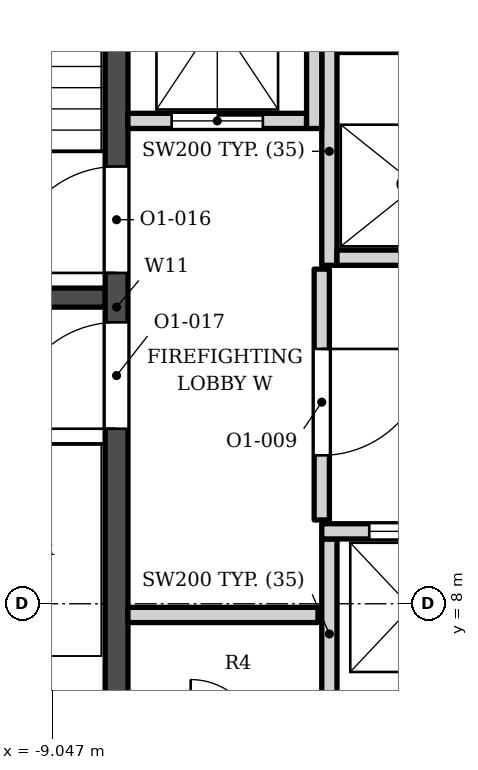
"""IFC4 building model, lengths in metres.
Left out: names, types, materials, properties, quantities, classifications, styles, units other than length and angle.
Written with IfcOpenShell. Run it as: python <this file> out.ifc"""

import sys

from ifc_helpers import new_model, si_unit, direction, frame, frame_2d, origin, place, context, subcontext, project, spatial, rectangle, extrude, element, fill, save


model = new_model("IFC4")
c1 = context("Model", 3, precision=1e-05, world=origin(), true_north=direction((0.0, 1.0)))
c2 = subcontext(c1, "Body", "Model", "MODEL_VIEW")
j1 = project(units=[si_unit("LENGTHUNIT", "METRE"), si_unit("PLANEANGLEUNIT", "RADIAN")], contexts=[c1])
p1 = place(None, origin())
s1 = spatial("IfcSite", under=j1, at=p1, CompositionType="ELEMENT")
p2 = place(p1, origin())
s2 = spatial("IfcBuilding", under=s1, at=p2, CompositionType="ELEMENT")
p3 = place(p2, frame((0.0, 0.0, 144.6)))
s3 = spatial("IfcBuildingStorey", under=s2, at=p3, CompositionType="ELEMENT", Elevation=144.6)
p4 = place(p3, frame((-8.2, 5.253, 0.0), z_axis=(0.0, 0.0, 1.0), x_axis=(0.0, 1.0, 0.0)))
e1 = element("IfcWall", 1, at=p4, inside=s3, PredefinedType="SHEAR", context=c2, shape_type="SweptSolid", body=[
    extrude(rectangle(XDim=13.3, YDim=0.3, at=frame_2d((6.65, 0.0))), origin(), (0.0, 0.0, 1.0), 3.9),
])
p5 = place(p4, frame((7.1, 0.0, 0.0)))
e2 = element("IfcOpeningElement", 2, at=p5, cuts=e1, PredefinedType="OPENING", context=c2, shape_type="SweptSolid", body=[
    extrude(rectangle(XDim=1.4, YDim=2.1, at=frame_2d((0.7, 1.05))), frame((0.0, 0.16, 0.0), z_axis=(0.0, -1.0, 0.0), x_axis=(1.0, 0.0, 0.0)), (0.0, 0.0, 1.0), 0.32),
])
p6 = place(p4, frame((5.05, 0.0, 0.0)))
e3 = element("IfcOpeningElement", 3, at=p6, cuts=e1, PredefinedType="OPENING", context=c2, shape_type="SweptSolid", body=[
    extrude(rectangle(XDim=1.4, YDim=2.1, at=frame_2d((0.7, 1.05))), frame((0.0, 0.16, 0.0), z_axis=(0.0, -1.0, 0.0), x_axis=(1.0, 0.0, 0.0)), (0.0, 0.0, 1.0), 0.32),
])
p7 = place(p3, frame((-12.1, 12.028, 0.0), z_axis=(0.0, 0.0, 1.0), x_axis=(1.0, 0.0, 0.0)))
e4 = element("IfcWall", 4, at=p7, inside=s3, PredefinedType="SHEAR", context=c2, shape_type="SweptSolid", body=[
    extrude(rectangle(XDim=3.75, YDim=0.25, at=frame_2d((1.875, 0.0))), origin(), (0.0, 0.0, 1.0), 3.9),
])
for number, where, z_axis, x_axis in (
    (5, (-5.4, 6.353, 0.0), (0.0, 0.0, 1.0), (0.0, 1.0, 0.0)),
    (6, (-8.05, 7.853, 0.0), (0.0, 0.0, 1.0), (1.0, 0.0, 0.0)),
):
    element("IfcWall", number, at=place(p3, frame(where, z_axis=z_axis, x_axis=x_axis)), inside=s3, PredefinedType="SOLIDWALL", context=c2, shape_type="SweptSolid", body=[
        extrude(rectangle(XDim=2.5, YDim=0.2, at=frame_2d((1.25, 0.0))), origin(), (0.0, 0.0, 1.0), 3.73),
    ])
p8 = place(p3, frame((-5.5, 8.953, 0.0), z_axis=(0.0, 0.0, 1.0), x_axis=(1.0, 0.0, 0.0)))
e7 = element("IfcWall", 7, at=p8, inside=s3, PredefinedType="SOLIDWALL", context=c2, shape_type="SweptSolid", body=[
    extrude(rectangle(XDim=4.5, YDim=0.2, at=frame_2d((2.25, 0.0))), origin(), (0.0, 0.0, 1.0), 3.73),
])
p9 = place(p8, frame((0.625, 0.0, 0.0)))
e8 = element("IfcOpeningElement", 8, at=p9, cuts=e7, PredefinedType="OPENING", context=c2, shape_type="SweptSolid", body=[
    extrude(rectangle(XDim=1.1, YDim=2.1, at=frame_2d((0.55, 1.05))), frame((0.0, 0.11, 0.0), z_axis=(0.0, -1.0, 0.0), x_axis=(1.0, 0.0, 0.0)), (0.0, 0.0, 1.0), 0.22),
])
p10 = place(p8, frame((2.775, 0.0, 0.0)))
e9 = element("IfcOpeningElement", 9, at=p10, cuts=e7, PredefinedType="OPENING", context=c2, shape_type="SweptSolid", body=[
    extrude(rectangle(XDim=1.1, YDim=2.1, at=frame_2d((0.55, 1.05))), frame((0.0, 0.11, 0.0), z_axis=(0.0, -1.0, 0.0), x_axis=(1.0, 0.0, 0.0)), (0.0, 0.0, 1.0), 0.22),
])
p11 = place(p3, frame((-5.5, 9.103, 0.0), z_axis=(0.0, 0.0, 1.0), x_axis=(0.0, 1.0, 0.0)))
e10 = element("IfcWall", 10, at=p11, inside=s3, PredefinedType="SOLIDWALL", context=c2, shape_type="SweptSolid", body=[
    extrude(rectangle(XDim=3.3, YDim=0.2, at=frame_2d((1.65, 0.0))), origin(), (0.0, 0.0, 1.0), 3.73),
])
p12 = place(p11, frame((0.85, 0.0, 0.0)))
e11 = element("IfcOpeningElement", 11, at=p12, cuts=e10, PredefinedType="OPENING", context=c2, shape_type="SweptSolid", body=[
    extrude(rectangle(XDim=1.4, YDim=2.1, at=frame_2d((0.7, 1.05))), frame((0.0, 0.11, 0.0), z_axis=(0.0, -1.0, 0.0), x_axis=(1.0, 0.0, 0.0)), (0.0, 0.0, 1.0), 0.22),
])
p13 = place(p3, frame((-5.4, 12.453, 0.0), z_axis=(0.0, 0.0, 1.0), x_axis=(0.0, 1.0, 0.0)))
e12 = element("IfcWall", 12, at=p13, inside=s3, PredefinedType="SOLIDWALL", context=c2, shape_type="SweptSolid", body=[
    extrude(rectangle(XDim=3.0, YDim=0.2, at=frame_2d((1.5, 0.0))), origin(), (0.0, 0.0, 1.0), 3.73),
])
p14 = place(p3, frame((-5.3, 12.552, 0.0), z_axis=(0.0, 0.0, 1.0), x_axis=(1.0, 0.0, 0.0)))
e13 = element("IfcWall", 13, at=p14, inside=s3, PredefinedType="SOLIDWALL", context=c2, shape_type="SweptSolid", body=[
    extrude(rectangle(XDim=2.1, YDim=0.2, at=frame_2d((1.05, 0.0))), origin(), (0.0, 0.0, 1.0), 3.73),
])
p15 = place(p3, frame((-8.05, 14.353, 0.0), z_axis=(0.0, 0.0, 1.0), x_axis=(1.0, 0.0, 0.0)))
e14 = element("IfcWall", 14, at=p15, inside=s3, PredefinedType="SOLIDWALL", context=c2, shape_type="SweptSolid", body=[
    extrude(rectangle(XDim=2.35, YDim=0.2, at=frame_2d((1.175, 0.0))), origin(), (0.0, 0.0, 1.0), 3.73),
])
p16 = place(p15, frame((0.575, 0.0, 0.0)))
e15 = element("IfcOpeningElement", 15, at=p16, cuts=e14, PredefinedType="OPENING", context=c2, shape_type="SweptSolid", body=[
    extrude(rectangle(XDim=1.2, YDim=2.1, at=frame_2d((0.6, 1.05))), frame((0.0, 0.11, 0.0), z_axis=(0.0, -1.0, 0.0), x_axis=(1.0, 0.0, 0.0)), (0.0, 0.0, 1.0), 0.22),
])
p17 = place(p3, frame((-5.6, 14.253, 0.0), z_axis=(0.0, 0.0, 1.0), x_axis=(0.0, 1.0, 0.0)))
e16 = element("IfcWall", 16, at=p17, inside=s3, PredefinedType="SOLIDWALL", context=c2, shape_type="SweptSolid", body=[
    extrude(rectangle(XDim=4.3, YDim=0.2, at=frame_2d((2.15, 0.0))), origin(), (0.0, 0.0, 1.0), 3.73),
])
p18 = place(p3, frame((-5.3, 15.353, 0.0), z_axis=(0.0, 0.0, 1.0), x_axis=(1.0, 0.0, 0.0)))
e17 = element("IfcWall", 17, at=p18, inside=s3, PredefinedType="SOLIDWALL", context=c2, shape_type="SweptSolid", body=[
    extrude(rectangle(XDim=2.1, YDim=0.2, at=frame_2d((1.05, 0.0))), origin(), (0.0, 0.0, 1.0), 3.73),
])
p19 = place(p9, origin())
e18 = element("IfcDoor", 18, at=p19, inside=s3, OperationType="DOUBLE_DOOR_SLIDING", PredefinedType="DOOR", context=c2, shape_type="SweptSolid", body=[
    extrude(rectangle(XDim=1.1, YDim=2.1, at=frame_2d((0.55, 1.05))), frame((0.0, 0.025, 0.0), z_axis=(0.0, -1.0, 0.0), x_axis=(1.0, 0.0, 0.0)), (0.0, 0.0, 1.0), 0.05),
])
fill(e8, e18)
p20 = place(p16, origin())
e19 = element("IfcDoor", 19, at=p20, inside=s3, OperationType="DOUBLE_DOOR_SLIDING", PredefinedType="DOOR", context=c2, shape_type="SweptSolid", body=[
    extrude(rectangle(XDim=1.2, YDim=2.1, at=frame_2d((0.6, 1.05))), frame((0.0, 0.025, 0.0), z_axis=(0.0, -1.0, 0.0), x_axis=(1.0, 0.0, 0.0)), (0.0, 0.0, 1.0), 0.05),
])
fill(e15, e19)
p21 = place(p5, origin())
e20 = element("IfcDoor", 20, at=p21, inside=s3, OperationType="SINGLE_SWING_LEFT", PredefinedType="DOOR", context=c2, shape_type="SweptSolid", body=[
    extrude(rectangle(XDim=1.4, YDim=2.1, at=frame_2d((0.7, 1.05))), frame((0.0, 0.025, 0.0), z_axis=(0.0, -1.0, 0.0), x_axis=(1.0, 0.0, 0.0)), (0.0, 0.0, 1.0), 0.05),
])
fill(e2, e20)
p22 = place(p6, origin())
e21 = element("IfcDoor", 21, at=p22, inside=s3, OperationType="SINGLE_SWING_LEFT", PredefinedType="DOOR", context=c2, shape_type="SweptSolid", body=[
    extrude(rectangle(XDim=1.4, YDim=2.1, at=frame_2d((0.7, 1.05))), frame((0.0, 0.025, 0.0), z_axis=(0.0, -1.0, 0.0), x_axis=(1.0, 0.0, 0.0)), (0.0, 0.0, 1.0), 0.05),
])
fill(e3, e21)
p23 = place(p12, origin())
e22 = element("IfcDoor", 22, at=p23, inside=s3, OperationType="SINGLE_SWING_RIGHT", PredefinedType="DOOR", context=c2, shape_type="SweptSolid", body=[
    extrude(rectangle(XDim=1.4, YDim=2.1, at=frame_2d((0.7, 1.05))), frame((0.0, 0.025, 0.0), z_axis=(0.0, -1.0, 0.0), x_axis=(1.0, 0.0, 0.0)), (0.0, 0.0, 1.0), 0.05),
])
fill(e11, e22)
save(model, sys.argv[1])
